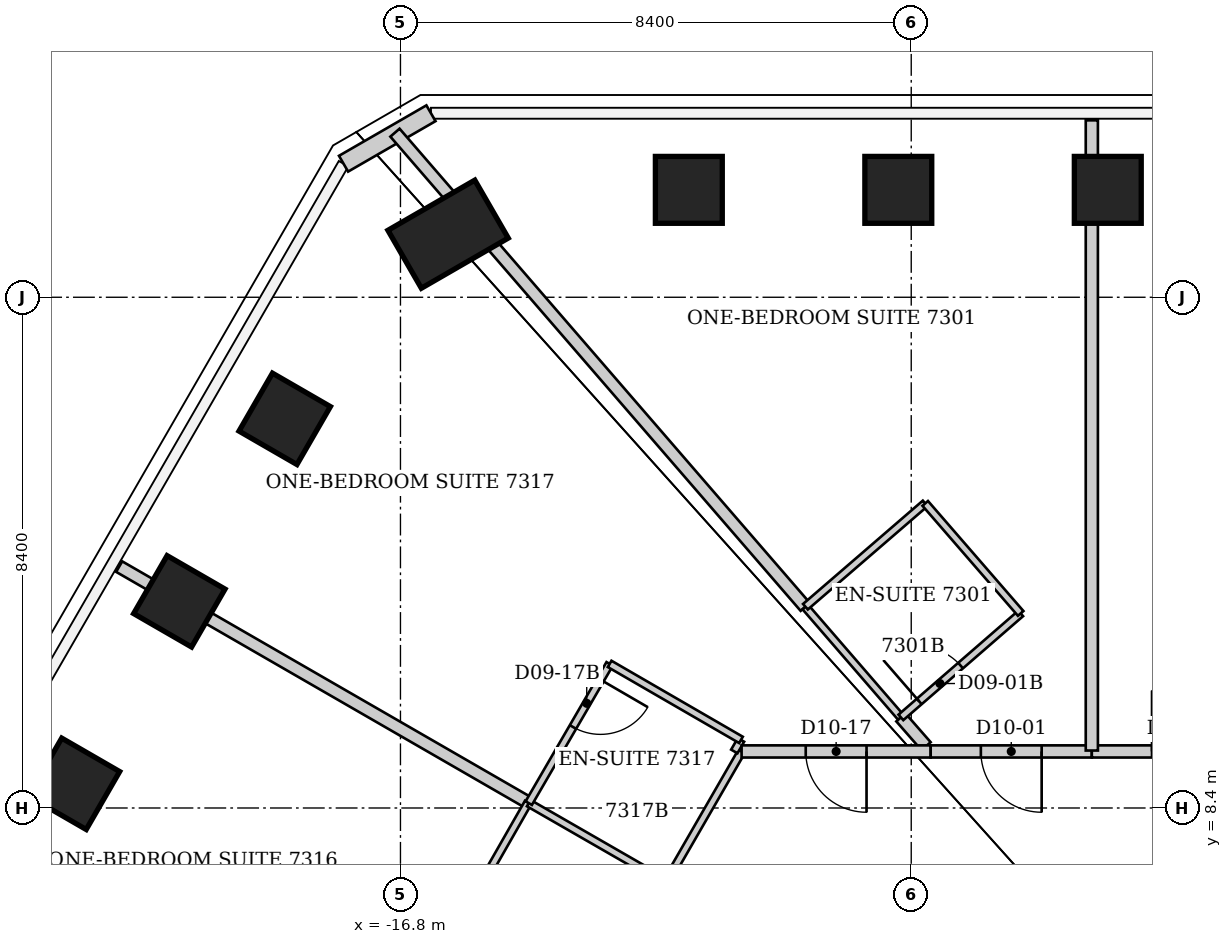
"""IFC4 building model, lengths in metres.
Left out: names, types, materials, properties, quantities, classifications, styles, units other than length and angle.
Written with IfcOpenShell. Run it as: python <this file> out.ifc"""

import sys

from ifc_helpers import new_model, si_unit, direction, frame, frame_2d, origin, origin_2d, place, context, subcontext, project, spatial, rectangle, extrude, element, fill, save


model = new_model("IFC4")
c1 = context("Model", 3, precision=1e-05, world=origin(), true_north=direction((0.0, 1.0)))
c2 = subcontext(c1, "Body", "Model", "MODEL_VIEW")
j1 = project(units=[si_unit("LENGTHUNIT", "METRE"), si_unit("PLANEANGLEUNIT", "RADIAN")], contexts=[c1])
p1 = place(None, origin())
s1 = spatial("IfcSite", under=j1, at=p1, CompositionType="ELEMENT")
p2 = place(p1, origin())
s2 = spatial("IfcBuilding", under=s1, at=p2, CompositionType="ELEMENT")
p3 = place(p2, frame((0.0, 0.0, 291.2)))
s3 = spatial("IfcBuildingStorey", under=s2, at=p3, CompositionType="ELEMENT", Elevation=291.2)
for number, where, z_axis, x_axis in (
    (1, (-12.058, 18.566, 0.0), (0.0, 0.0, 1.0), (0.0, 1.0, 0.0)),
    (2, (-8.613, 18.566, 0.0), (0.0, 0.0, 1.0), (0.0, 1.0, 0.0)),
    (3, (-5.167, 18.566, 0.0), (0.0, 0.0, 1.0), (0.0, 1.0, 0.0)),
    (4, (-22.169, 8.798, 0.0), (0.0, 0.0, 1.0), (-0.866, 0.5, 0.0)),
    (5, (-20.437, 11.799, 0.0), (0.0, 0.0, 1.0), (-0.866, 0.5, 0.0)),
    (6, (-18.704, 14.8, 0.0), (0.0, 0.0, 1.0), (-0.866, 0.5, 0.0)),
):
    element("IfcColumn", number, at=place(p3, frame(where, z_axis=z_axis, x_axis=x_axis)), inside=s3, PredefinedType="COLUMN", context=c2, shape_type="SweptSolid", body=[
        extrude(rectangle(XDim=1.1, YDim=1.1, at=origin_2d()), origin(), (0.0, 0.0, 1.0), 3.8),
    ])
p4 = place(p3, frame((-16.017, 17.837, 0.0), z_axis=(0.0, 0.0, 1.0), x_axis=(-0.5, 0.866025403784, 0.0)))
e7 = element("IfcColumn", 7, at=p4, inside=s3, PredefinedType="COLUMN", context=c2, shape_type="SweptSolid", body=[
    extrude(rectangle(XDim=1.1, YDim=1.65, at=origin_2d()), origin(), (0.0, 0.0, 1.0), 3.8),
])
p5 = place(p3, frame((-17.736, 18.996, 0.0), z_axis=(0.0, 0.0, 1.0), x_axis=(0.866026405774, 0.499998264499, 0.0)))
e8 = element("IfcWall", 8, at=p5, inside=s3, PredefinedType="SOLIDWALL", context=c2, shape_type="SweptSolid", body=[
    extrude(rectangle(XDim=1.66, YDim=0.3, at=frame_2d((0.83, 0.0))), origin(), (0.0, 0.0, 1.0), 3.64),
])
p6 = place(p3, frame((-21.426, 12.37, 0.0), z_axis=(0.0, 0.0, 1.0), x_axis=(0.866202335538, -0.499693419917, 0.0)))
e9 = element("IfcWall", 9, at=p6, inside=s3, PredefinedType="PARTITIONING", context=c2, shape_type="SweptSolid", body=[
    extrude(rectangle(XDim=7.765, YDim=0.2, at=frame_2d((3.883, 0.0))), origin(), (0.0, 0.0, 1.0), 2.878),
])
p7 = place(p3, frame((-16.89, 19.507, 0.0), z_axis=(0.0, 0.0, 1.0), x_axis=(0.654250750888, -0.756277696989, 0.0)))
e10 = element("IfcWall", 10, at=p7, inside=s3, PredefinedType="PARTITIONING", context=c2, shape_type="SweptSolid", body=[
    extrude(rectangle(XDim=10.313, YDim=0.2, at=frame_2d((5.157, 0.0))), origin(), (0.0, 0.0, 1.0), 3.64),
])
p8 = place(p3, frame((-14.7, 8.49, 0.0), z_axis=(0.0, 0.0, 1.0), x_axis=(-0.496106327528, -0.868261776072, 0.0)))
e11 = element("IfcWall", 11, at=p8, inside=s3, PredefinedType="PARTITIONING", context=c2, shape_type="SweptSolid", body=[
    extrude(rectangle(XDim=2.419, YDim=0.12, at=frame_2d((1.209, 0.0))), origin(), (0.0, 0.0, 1.0), 3.64),
])
p9 = place(p3, frame((-14.69, 8.48, 0.0), z_axis=(0.0, 0.0, 1.0), x_axis=(0.866816256489, -0.498627694264, 0.0)))
e12 = element("IfcWall", 12, at=p9, inside=s3, PredefinedType="PARTITIONING", context=c2, shape_type="SweptSolid", body=[
    extrude(rectangle(XDim=2.607, YDim=0.12, at=frame_2d((1.304, 0.0))), origin(), (0.0, 0.0, 1.0), 2.878),
])
p10 = place(p3, frame((-13.36, 10.77, 0.0), z_axis=(0.0, 0.0, 1.0), x_axis=(-0.502173326652, -0.864766991738, 0.0)))
e13 = element("IfcWall", 13, at=p10, inside=s3, PredefinedType="PARTITIONING", context=c2, shape_type="SweptSolid", body=[
    extrude(rectangle(XDim=2.648, YDim=0.12, at=frame_2d((1.324, 0.0))), origin(), (0.0, 0.0, 1.0), 3.64),
])
p11 = place(p10, frame((0.3, 0.0, 0.0)))
e14 = element("IfcOpeningElement", 14, at=p11, cuts=e13, PredefinedType="OPENING", context=c2, shape_type="SweptSolid", body=[
    extrude(rectangle(XDim=0.9, YDim=2.03, at=frame_2d((0.45, 1.015))), frame((0.0, 0.06, 0.0), z_axis=(0.0, -1.0, 0.0), x_axis=(1.0, 0.0, 0.0)), (0.0, 0.0, 1.0), 0.12),
])
p12 = place(p3, frame((-12.43, 7.18, 0.0), z_axis=(0.0, 0.0, 1.0), x_axis=(0.499577688184, 0.866269088372, 0.0)))
e15 = element("IfcWall", 15, at=p12, inside=s3, PredefinedType="PARTITIONING", context=c2, shape_type="SweptSolid", body=[
    extrude(rectangle(XDim=2.482, YDim=0.12, at=frame_2d((1.241, 0.0))), origin(), (0.0, 0.0, 1.0), 3.64),
])
p13 = place(p3, frame((-11.31, 9.33, 0.0), z_axis=(0.0, 0.0, 1.0), x_axis=(0.501518373175, 0.865146994081, 0.0)))
e16 = element("IfcWall", 16, at=p13, inside=s3, PredefinedType="PARTITIONING", context=c2, shape_type="SweptSolid", body=[
    extrude(rectangle(XDim=0.219, YDim=0.12, at=frame_2d((0.11, 0.0))), origin(), (0.0, 0.0, 1.0), 3.64),
])
p14 = place(p3, frame((-11.2, 9.52, 0.0), z_axis=(0.0, 0.0, 1.0), x_axis=(-0.865533423938, 0.500851167559, 0.0)))
e17 = element("IfcWall", 17, at=p14, inside=s3, PredefinedType="PARTITIONING", context=c2, shape_type="SweptSolid", body=[
    extrude(rectangle(XDim=2.496, YDim=0.12, at=frame_2d((1.248, 0.0))), origin(), (0.0, 0.0, 1.0), 3.64),
])
p15 = place(p3, frame((-10.143, 11.708, 0.0), z_axis=(0.0, 0.0, 1.0), x_axis=(0.65433095071, -0.756208309226, 0.0)))
e18 = element("IfcWall", 18, at=p15, inside=s3, PredefinedType="PARTITIONING", context=c2, shape_type="SweptSolid", body=[
    extrude(rectangle(XDim=2.404, YDim=0.12, at=frame_2d((1.202, 0.0))), origin(), (0.0, 0.0, 1.0), 3.64),
])
p16 = place(p3, frame((-8.57, 9.89, 0.0), z_axis=(0.0, 0.0, 1.0), x_axis=(0.658587029901, -0.752504567459, 0.0)))
e19 = element("IfcWall", 19, at=p16, inside=s3, PredefinedType="PARTITIONING", context=c2, shape_type="SweptSolid", body=[
    extrude(rectangle(XDim=0.629, YDim=0.2, at=frame_2d((0.314, 0.0))), origin(), (0.0, 0.0, 1.0), 3.64),
])
p17 = place(p3, frame((-8.57, 9.89, 0.0), z_axis=(0.0, 0.0, 1.0), x_axis=(0.755185511235, 0.655511131576, 0.0)))
e20 = element("IfcWall", 20, at=p17, inside=s3, PredefinedType="PARTITIONING", context=c2, shape_type="SweptSolid", body=[
    extrude(rectangle(XDim=2.609, YDim=0.12, at=frame_2d((1.304, 0.0))), origin(), (0.0, 0.0, 1.0), 3.64),
])
p18 = place(p17, frame((0.4, 0.0, 0.0)))
e21 = element("IfcOpeningElement", 21, at=p18, cuts=e20, PredefinedType="OPENING", context=c2, shape_type="SweptSolid", body=[
    extrude(rectangle(XDim=0.9, YDim=2.03, at=frame_2d((0.45, 1.015))), frame((0.0, 0.06, 0.0), z_axis=(0.0, -1.0, 0.0), x_axis=(1.0, 0.0, 0.0)), (0.0, 0.0, 1.0), 0.12),
])
p19 = place(p3, frame((-8.17, 13.41, 0.0), z_axis=(0.0, 0.0, 1.0), x_axis=(-0.757086659925, -0.653314464377, 0.0)))
e22 = element("IfcWall", 22, at=p19, inside=s3, PredefinedType="PARTITIONING", context=c2, shape_type="SweptSolid", body=[
    extrude(rectangle(XDim=2.602, YDim=0.12, at=frame_2d((1.301, 0.0))), origin(), (0.0, 0.0, 1.0), 3.64),
])
p20 = place(p3, frame((-8.08, 9.33, 0.0), z_axis=(0.0, 0.0, 1.0), x_axis=(-1.0, 0.0, 0.0)))
e23 = element("IfcWall", 23, at=p20, inside=s3, PredefinedType="PARTITIONING", context=c2, shape_type="SweptSolid", body=[
    extrude(rectangle(XDim=3.11, YDim=0.2, at=frame_2d((1.555, 0.0))), origin(), (0.0, 0.0, 1.0), 3.64),
])
p21 = place(p20, frame((1.055, 0.0, 0.0)))
e24 = element("IfcOpeningElement", 24, at=p21, cuts=e23, PredefinedType="OPENING", context=c2, shape_type="SweptSolid", body=[
    extrude(rectangle(XDim=1.0, YDim=2.13, at=frame_2d((0.5, 1.065))), frame((0.0, 0.1, 0.0), z_axis=(0.0, -1.0, 0.0), x_axis=(1.0, 0.0, 0.0)), (0.0, 0.0, 1.0), 0.2),
])
p22 = place(p3, frame((-6.6, 11.6, 0.0), z_axis=(0.0, 0.0, 1.0), x_axis=(-0.655244729861, 0.755416669123, 0.0)))
e25 = element("IfcWall", 25, at=p22, inside=s3, PredefinedType="PARTITIONING", context=c2, shape_type="SweptSolid", body=[
    extrude(rectangle(XDim=2.396, YDim=0.12, at=frame_2d((1.198, 0.0))), origin(), (0.0, 0.0, 1.0), 3.64),
])
p23 = place(p3, frame((-5.43, 9.33, 0.0), z_axis=(0.0, 0.0, 1.0), x_axis=(-1.0, 0.0, 0.0)))
e26 = element("IfcWall", 26, at=p23, inside=s3, PredefinedType="PARTITIONING", context=c2, shape_type="SweptSolid", body=[
    extrude(rectangle(XDim=2.65, YDim=0.2, at=frame_2d((1.325, 0.0))), origin(), (0.0, 0.0, 1.0), 3.64),
])
p24 = place(p23, frame((0.825, 0.0, 0.0)))
e27 = element("IfcOpeningElement", 27, at=p24, cuts=e26, PredefinedType="OPENING", context=c2, shape_type="SweptSolid", body=[
    extrude(rectangle(XDim=1.0, YDim=2.13, at=frame_2d((0.5, 1.065))), frame((0.0, 0.1, 0.0), z_axis=(0.0, -1.0, 0.0), x_axis=(1.0, 0.0, 0.0)), (0.0, 0.0, 1.0), 0.2),
])
p25 = place(p3, frame((-5.43, 9.33, 0.0), z_axis=(0.0, 0.0, 1.0), x_axis=(1.0, 0.0, 0.0)))
e28 = element("IfcWall", 28, at=p25, inside=s3, PredefinedType="PARTITIONING", context=c2, shape_type="SweptSolid", body=[
    extrude(rectangle(XDim=2.98, YDim=0.2, at=frame_2d((1.49, 0.0))), origin(), (0.0, 0.0, 1.0), 3.64),
])
p26 = place(p25, frame((0.99, 0.0, 0.0)))
e29 = element("IfcOpeningElement", 29, at=p26, cuts=e28, PredefinedType="OPENING", context=c2, shape_type="SweptSolid", body=[
    extrude(rectangle(XDim=1.0, YDim=2.13, at=frame_2d((0.5, 1.065))), frame((0.0, 0.1, 0.0), z_axis=(0.0, -1.0, 0.0), x_axis=(1.0, 0.0, 0.0)), (0.0, 0.0, 1.0), 0.2),
])
p27 = place(p3, frame((-5.43, 19.71, 0.0), z_axis=(0.0, 0.0, 1.0), x_axis=(0.0, -1.0, 0.0)))
e30 = element("IfcWall", 30, at=p27, inside=s3, PredefinedType="PARTITIONING", context=c2, shape_type="SweptSolid", body=[
    extrude(rectangle(XDim=10.365, YDim=0.2, at=frame_2d((5.183, 0.0))), origin(), (0.0, 0.0, 1.0), 3.64),
])
p28 = place(p24, origin())
e31 = element("IfcDoor", 31, at=p28, inside=s3, OperationType="SINGLE_SWING_LEFT", PredefinedType="DOOR", context=c2, shape_type="SweptSolid", body=[
    extrude(rectangle(XDim=1.0, YDim=2.13, at=frame_2d((0.5, 1.065))), frame((0.0, 0.025, 0.0), z_axis=(0.0, -1.0, 0.0), x_axis=(1.0, 0.0, 0.0)), (0.0, 0.0, 1.0), 0.05),
])
fill(e27, e31)
p29 = place(p18, origin())
e32 = element("IfcDoor", 32, at=p29, inside=s3, OperationType="SINGLE_SWING_LEFT", PredefinedType="DOOR", context=c2, shape_type="SweptSolid", body=[
    extrude(rectangle(XDim=0.9, YDim=2.03, at=frame_2d((0.45, 1.015))), frame((0.0, 0.025, 0.0), z_axis=(0.0, -1.0, 0.0), x_axis=(1.0, 0.0, 0.0)), (0.0, 0.0, 1.0), 0.05),
])
fill(e21, e32)
p30 = place(p26, origin())
e33 = element("IfcDoor", 33, at=p30, inside=s3, OperationType="SINGLE_SWING_LEFT", PredefinedType="DOOR", context=c2, shape_type="SweptSolid", body=[
    extrude(rectangle(XDim=1.0, YDim=2.13, at=frame_2d((0.5, 1.065))), frame((0.0, 0.025, 0.0), z_axis=(0.0, -1.0, 0.0), x_axis=(1.0, 0.0, 0.0)), (0.0, 0.0, 1.0), 0.05),
])
fill(e29, e33)
p31 = place(p21, origin())
e34 = element("IfcDoor", 34, at=p31, inside=s3, OperationType="SINGLE_SWING_LEFT", PredefinedType="DOOR", context=c2, shape_type="SweptSolid", body=[
    extrude(rectangle(XDim=1.0, YDim=2.13, at=frame_2d((0.5, 1.065))), frame((0.0, 0.025, 0.0), z_axis=(0.0, -1.0, 0.0), x_axis=(1.0, 0.0, 0.0)), (0.0, 0.0, 1.0), 0.05),
])
fill(e24, e34)
p32 = place(p11, origin())
e35 = element("IfcDoor", 35, at=p32, inside=s3, OperationType="SINGLE_SWING_LEFT", PredefinedType="DOOR", context=c2, shape_type="SweptSolid", body=[
    extrude(rectangle(XDim=0.9, YDim=2.03, at=frame_2d((0.45, 1.015))), frame((0.0, 0.025, 0.0), z_axis=(0.0, -1.0, 0.0), x_axis=(1.0, 0.0, 0.0)), (0.0, 0.0, 1.0), 0.05),
])
fill(e14, e35)
save(model, sys.argv[1])
